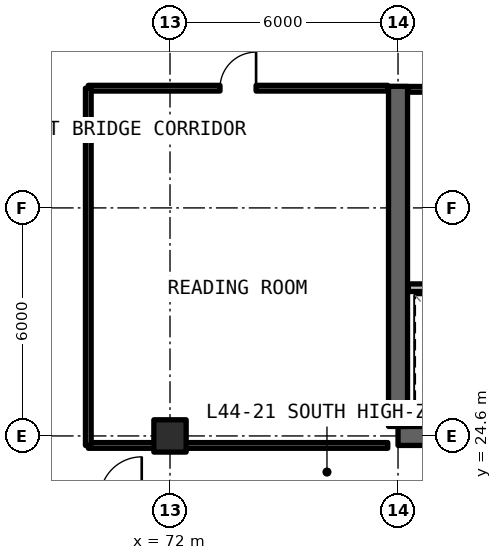
"""IFC4 building model, lengths in metres.
Left out: names, types, materials, properties, quantities, classifications, styles, units other than length and angle.
Written with IfcOpenShell. Run it as: python <this file> out.ifc"""

import sys

from ifc_helpers import new_model, si_unit, direction, frame, frame_2d, origin, origin_2d, place, context, subcontext, project, spatial, rectangle, extrude, element, fill, save


model = new_model("IFC4")
c1 = context("Model", 3, precision=1e-05, world=origin(), true_north=direction((0.0, 1.0)))
c2 = subcontext(c1, "Body", "Model", "MODEL_VIEW")
j1 = project(units=[si_unit("LENGTHUNIT", "METRE"), si_unit("PLANEANGLEUNIT", "RADIAN")], contexts=[c1])
p1 = place(None, origin())
s1 = spatial("IfcSite", under=j1, at=p1, CompositionType="ELEMENT")
p2 = place(p1, origin())
s2 = spatial("IfcBuilding", under=s1, at=p2, CompositionType="ELEMENT")
p3 = place(p2, frame((0.0, 0.0, 158.4)))
s3 = spatial("IfcBuildingStorey", under=s2, at=p3, CompositionType="ELEMENT", Elevation=158.4)
p4 = place(p3, frame((78.0, 24.6, 0.0), z_axis=(0.0, 0.0, 1.0), x_axis=(1.0, 0.0, 0.0)))
e1 = element("IfcWall", 1, at=p4, inside=s3, PredefinedType="SHEAR", context=c2, shape_type="SweptSolid", body=[
    extrude(rectangle(XDim=12.0, YDim=0.5, at=frame_2d((6.0, 0.0))), origin(), (0.0, 0.0, 1.0), 3.63),
])
p5 = place(p3, frame((78.0, 24.85, 0.0), z_axis=(0.0, 0.0, 1.0), x_axis=(0.0, 1.0, 0.0)))
e2 = element("IfcWall", 2, at=p5, inside=s3, PredefinedType="SHEAR", context=c2, shape_type="SweptSolid", body=[
    extrude(rectangle(XDim=8.95, YDim=0.5, at=frame_2d((4.475, 0.0))), origin(), (0.0, 0.0, 1.0), 3.63),
])
p6 = place(p3, frame((72.0, 24.6, 0.0), z_axis=(0.0, 0.0, 1.0), x_axis=(1.0, 0.0, 0.0)))
e3 = element("IfcColumn", 3, at=p6, inside=s3, PredefinedType="COLUMN", context=c2, shape_type="SweptSolid", body=[
    extrude(rectangle(XDim=0.85, YDim=0.85, at=origin_2d()), origin(), (0.0, 0.0, 1.0), 3.63),
])
p7 = place(p3, frame((78.27, 28.5, 0.0), z_axis=(0.0, 0.0, 1.0), x_axis=(1.0, 0.0, 0.0)))
e4 = element("IfcWall", 4, at=p7, inside=s3, PredefinedType="SOLIDWALL", context=c2, shape_type="SweptSolid", body=[
    extrude(rectangle(XDim=7.51, YDim=0.2, at=frame_2d((3.755, 0.0))), origin(), (0.0, 0.0, 1.0), 2.63),
])
p8 = place(p7, frame((3.53, 0.0, 0.0)))
e5 = element("IfcOpeningElement", 5, at=p8, cuts=e4, PredefinedType="OPENING", context=c2, shape_type="SweptSolid", body=[
    extrude(rectangle(XDim=1.0, YDim=2.15, at=frame_2d((0.5, 1.075))), frame((0.0, 0.11, 0.0), z_axis=(0.0, -1.0, 0.0), x_axis=(1.0, 0.0, 0.0)), (0.0, 0.0, 1.0), 0.22),
])
p9 = place(p3, frame((78.27, 33.72, 0.0), z_axis=(0.0, 0.0, 1.0), x_axis=(1.0, 0.0, 0.0)))
e6 = element("IfcWall", 6, at=p9, inside=s3, PredefinedType="SOLIDWALL", context=c2, shape_type="SweptSolid", body=[
    extrude(rectangle(XDim=3.05, YDim=0.15, at=frame_2d((1.525, 0.0))), origin(), (0.0, 0.0, 1.0), 2.63),
])
p10 = place(p3, frame((69.85, 24.35, 0.0), z_axis=(0.0, 0.0, 1.0), x_axis=(1.0, 0.0, 0.0)))
e7 = element("IfcWall", 7, at=p10, inside=s3, PredefinedType="SOLIDWALL", context=c2, shape_type="SweptSolid", body=[
    extrude(rectangle(XDim=7.88, YDim=0.15, at=frame_2d((3.94, 0.0))), origin(), (0.0, 0.0, 1.0), 2.63),
])
p11 = place(p3, frame((69.85, 33.75, 0.0), z_axis=(0.0, 0.0, 1.0), x_axis=(1.0, 0.0, 0.0)))
e8 = element("IfcWall", 8, at=p11, inside=s3, PredefinedType="SOLIDWALL", context=c2, shape_type="SweptSolid", body=[
    extrude(rectangle(XDim=7.88, YDim=0.15, at=frame_2d((3.94, 0.0))), origin(), (0.0, 0.0, 1.0), 2.63),
])
p12 = place(p11, frame((3.465, 0.0, 0.0)))
e9 = element("IfcOpeningElement", 9, at=p12, cuts=e8, PredefinedType="OPENING", context=c2, shape_type="SweptSolid", body=[
    extrude(rectangle(XDim=0.95, YDim=2.15, at=frame_2d((0.475, 1.075))), frame((0.0, 0.085, 0.0), z_axis=(0.0, -1.0, 0.0), x_axis=(1.0, 0.0, 0.0)), (0.0, 0.0, 1.0), 0.17),
])
p13 = place(p3, frame((69.85, 24.35, 0.0), z_axis=(0.0, 0.0, 1.0), x_axis=(0.0, 1.0, 0.0)))
e10 = element("IfcWall", 10, at=p13, inside=s3, PredefinedType="SOLIDWALL", context=c2, shape_type="SweptSolid", body=[
    extrude(rectangle(XDim=9.4, YDim=0.15, at=frame_2d((4.7, 0.0))), origin(), (0.0, 0.0, 1.0), 2.63),
])
p14 = place(p12, origin())
e11 = element("IfcDoor", 11, at=p14, inside=s3, OperationType="SINGLE_SWING_RIGHT", PredefinedType="DOOR", context=c2, shape_type="SweptSolid", body=[
    extrude(rectangle(XDim=0.95, YDim=2.15, at=frame_2d((0.475, 1.075))), frame((0.0, 0.025, 0.0), z_axis=(0.0, -1.0, 0.0), x_axis=(1.0, 0.0, 0.0)), (0.0, 0.0, 1.0), 0.05),
])
fill(e9, e11)
save(model, sys.argv[1])
